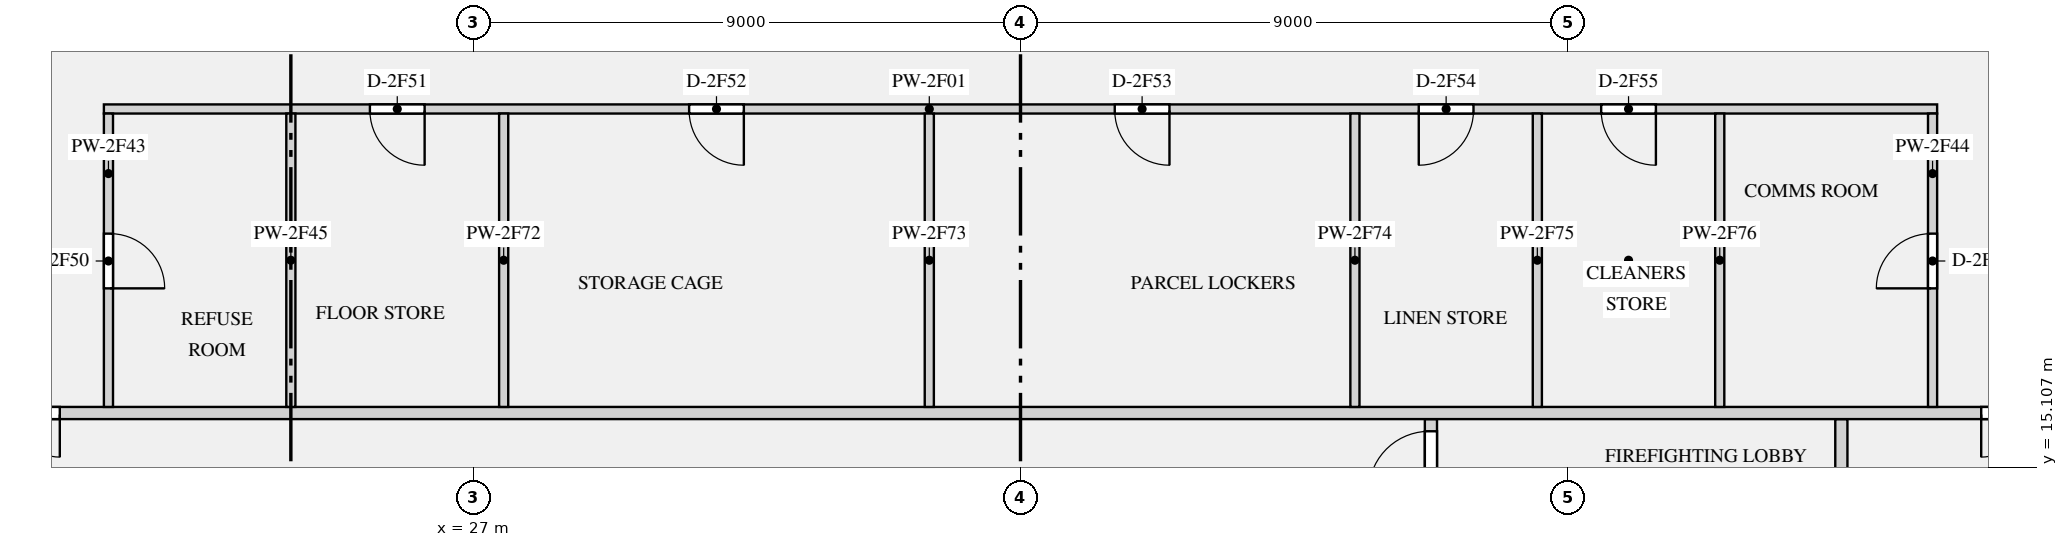
"""IFC4 building model, lengths in metres.
Left out: names, types, materials, properties, quantities, classifications, styles, units other than length and angle.
Written with IfcOpenShell. Run it as: python <this file> out.ifc"""

import sys

from ifc_helpers import new_model, si_unit, direction, frame, frame_2d, origin, place, context, subcontext, project, spatial, rectangle, extrude, element, fill, save


model = new_model("IFC4")
c1 = context("Model", 3, precision=1e-05, world=origin(), true_north=direction((0.0, 1.0)))
c2 = subcontext(c1, "Body", "Model", "MODEL_VIEW")
j1 = project(units=[si_unit("LENGTHUNIT", "METRE"), si_unit("PLANEANGLEUNIT", "RADIAN")], contexts=[c1])
p1 = place(None, origin())
s1 = spatial("IfcSite", under=j1, at=p1, CompositionType="ELEMENT")
p2 = place(p1, origin())
s2 = spatial("IfcBuilding", under=s1, at=p2, CompositionType="ELEMENT")
p3 = place(p2, frame((0.0, 0.0, 124.5)))
s3 = spatial("IfcBuildingStorey", under=s2, at=p3, CompositionType="ELEMENT", Elevation=124.5)
p4 = place(p3, frame((49.5, 12.5, 0.0), z_axis=(0.0, 0.0, 1.0), x_axis=(0.0, 1.0, 0.0)))
e1 = element("IfcWall", 1, at=p4, inside=s3, PredefinedType="PARTITIONING", context=c2, shape_type="SweptSolid", body=[
    extrude(rectangle(XDim=3.4, YDim=0.2, at=frame_2d((1.7, 0.0))), origin(), (0.0, 0.0, 1.0), 2.83),
])
p5 = place(p4, frame((1.15, 0.0, 0.0)))
e2 = element("IfcOpeningElement", 2, at=p5, cuts=e1, PredefinedType="OPENING", context=c2, shape_type="SweptSolid", body=[
    extrude(rectangle(XDim=1.1, YDim=2.1, at=frame_2d((0.55, 1.05))), frame((0.0, 0.11, 0.0), z_axis=(0.0, -1.0, 0.0), x_axis=(1.0, 0.0, 0.0)), (0.0, 0.0, 1.0), 0.22),
])
p6 = place(p3, frame((42.75, 14.575, 0.0), z_axis=(0.0, 0.0, 1.0), x_axis=(0.0, 1.0, 0.0)))
e3 = element("IfcWall", 3, at=p6, inside=s3, PredefinedType="PARTITIONING", context=c2, shape_type="SweptSolid", body=[
    extrude(rectangle(XDim=1.325, YDim=0.2, at=frame_2d((0.663, 0.0))), origin(), (0.0, 0.0, 1.0), 2.83),
])
p7 = place(p6, frame((0.125, 0.0, 0.0)))
e4 = element("IfcOpeningElement", 4, at=p7, cuts=e3, PredefinedType="OPENING", context=c2, shape_type="SweptSolid", body=[
    extrude(rectangle(XDim=1.0, YDim=2.1, at=frame_2d((0.5, 1.05))), frame((0.0, 0.11, 0.0), z_axis=(0.0, -1.0, 0.0), x_axis=(1.0, 0.0, 0.0)), (0.0, 0.0, 1.0), 0.22),
])
p8 = place(p3, frame((20.925, 21.0, 0.0), z_axis=(0.0, 0.0, 1.0), x_axis=(1.0, 0.0, 0.0)))
e5 = element("IfcWall", 5, at=p8, inside=s3, PredefinedType="PARTITIONING", context=c2, shape_type="SweptSolid", body=[
    extrude(rectangle(XDim=30.15, YDim=0.15, at=frame_2d((15.075, 0.0))), origin(), (0.0, 0.0, 1.0), 2.83),
])
p9 = place(p8, frame((4.375, 0.0, 0.0)))
e6 = element("IfcOpeningElement", 6, at=p9, cuts=e5, PredefinedType="OPENING", context=c2, shape_type="SweptSolid", body=[
    extrude(rectangle(XDim=0.9, YDim=2.1, at=frame_2d((0.45, 1.05))), frame((0.0, 0.085, 0.0), z_axis=(0.0, -1.0, 0.0), x_axis=(1.0, 0.0, 0.0)), (0.0, 0.0, 1.0), 0.17),
])
p10 = place(p8, frame((9.625, 0.0, 0.0)))
e7 = element("IfcOpeningElement", 7, at=p10, cuts=e5, PredefinedType="OPENING", context=c2, shape_type="SweptSolid", body=[
    extrude(rectangle(XDim=0.9, YDim=2.1, at=frame_2d((0.45, 1.05))), frame((0.0, 0.085, 0.0), z_axis=(0.0, -1.0, 0.0), x_axis=(1.0, 0.0, 0.0)), (0.0, 0.0, 1.0), 0.17),
])
p11 = place(p8, frame((16.625, 0.0, 0.0)))
e8 = element("IfcOpeningElement", 8, at=p11, cuts=e5, PredefinedType="OPENING", context=c2, shape_type="SweptSolid", body=[
    extrude(rectangle(XDim=0.9, YDim=2.1, at=frame_2d((0.45, 1.05))), frame((0.0, 0.085, 0.0), z_axis=(0.0, -1.0, 0.0), x_axis=(1.0, 0.0, 0.0)), (0.0, 0.0, 1.0), 0.17),
])
p12 = place(p8, frame((21.625, 0.0, 0.0)))
e9 = element("IfcOpeningElement", 9, at=p12, cuts=e5, PredefinedType="OPENING", context=c2, shape_type="SweptSolid", body=[
    extrude(rectangle(XDim=0.9, YDim=2.1, at=frame_2d((0.45, 1.05))), frame((0.0, 0.085, 0.0), z_axis=(0.0, -1.0, 0.0), x_axis=(1.0, 0.0, 0.0)), (0.0, 0.0, 1.0), 0.17),
])
p13 = place(p8, frame((24.625, 0.0, 0.0)))
e10 = element("IfcOpeningElement", 10, at=p13, cuts=e5, PredefinedType="OPENING", context=c2, shape_type="SweptSolid", body=[
    extrude(rectangle(XDim=0.9, YDim=2.1, at=frame_2d((0.45, 1.05))), frame((0.0, 0.085, 0.0), z_axis=(0.0, -1.0, 0.0), x_axis=(1.0, 0.0, 0.0)), (0.0, 0.0, 1.0), 0.17),
])
p14 = place(p3, frame((17.9, 16.0, 0.0), z_axis=(0.0, 0.0, 1.0), x_axis=(1.0, 0.0, 0.0)))
e11 = element("IfcWall", 11, at=p14, inside=s3, PredefinedType="PARTITIONING", context=c2, shape_type="SweptSolid", body=[
    extrude(rectangle(XDim=36.2, YDim=0.2, at=frame_2d((18.1, 0.0))), origin(), (0.0, 0.0, 1.0), 2.83),
])
p15 = place(p14, frame((0.9, 0.0, 0.0)))
e12 = element("IfcOpeningElement", 12, at=p15, cuts=e11, PredefinedType="OPENING", context=c2, shape_type="SweptSolid", body=[
    extrude(rectangle(XDim=1.4, YDim=2.1, at=frame_2d((0.7, 1.05))), frame((0.0, 0.11, 0.0), z_axis=(0.0, -1.0, 0.0), x_axis=(1.0, 0.0, 0.0)), (0.0, 0.0, 1.0), 0.22),
])
p16 = place(p14, frame((33.9, 0.0, 0.0)))
e13 = element("IfcOpeningElement", 13, at=p16, cuts=e11, PredefinedType="OPENING", context=c2, shape_type="SweptSolid", body=[
    extrude(rectangle(XDim=1.4, YDim=2.1, at=frame_2d((0.7, 1.05))), frame((0.0, 0.11, 0.0), z_axis=(0.0, -1.0, 0.0), x_axis=(1.0, 0.0, 0.0)), (0.0, 0.0, 1.0), 0.22),
])
p17 = place(p3, frame((21.0, 16.1, 0.0), z_axis=(0.0, 0.0, 1.0), x_axis=(0.0, 1.0, 0.0)))
e14 = element("IfcWall", 14, at=p17, inside=s3, PredefinedType="PARTITIONING", context=c2, shape_type="SweptSolid", body=[
    extrude(rectangle(XDim=4.825, YDim=0.15, at=frame_2d((2.413, 0.0))), origin(), (0.0, 0.0, 1.0), 2.83),
])
p18 = place(p17, frame((1.95, 0.0, 0.0)))
e15 = element("IfcOpeningElement", 15, at=p18, cuts=e14, PredefinedType="OPENING", context=c2, shape_type="SweptSolid", body=[
    extrude(rectangle(XDim=0.9, YDim=2.1, at=frame_2d((0.45, 1.05))), frame((0.0, 0.085, 0.0), z_axis=(0.0, -1.0, 0.0), x_axis=(1.0, 0.0, 0.0)), (0.0, 0.0, 1.0), 0.17),
])
p19 = place(p3, frame((51.0, 16.1, 0.0), z_axis=(0.0, 0.0, 1.0), x_axis=(0.0, 1.0, 0.0)))
e16 = element("IfcWall", 16, at=p19, inside=s3, PredefinedType="PARTITIONING", context=c2, shape_type="SweptSolid", body=[
    extrude(rectangle(XDim=4.825, YDim=0.15, at=frame_2d((2.413, 0.0))), origin(), (0.0, 0.0, 1.0), 2.83),
])
p20 = place(p19, frame((1.95, 0.0, 0.0)))
e17 = element("IfcOpeningElement", 17, at=p20, cuts=e16, PredefinedType="OPENING", context=c2, shape_type="SweptSolid", body=[
    extrude(rectangle(XDim=0.9, YDim=2.1, at=frame_2d((0.45, 1.05))), frame((0.0, 0.085, 0.0), z_axis=(0.0, -1.0, 0.0), x_axis=(1.0, 0.0, 0.0)), (0.0, 0.0, 1.0), 0.17),
])
for number, where, z_axis, x_axis in (
    (18, (24.0, 16.1, 0.0), (0.0, 0.0, 1.0), (0.0, 1.0, 0.0)),
    (19, (27.5, 16.1, 0.0), (0.0, 0.0, 1.0), (0.0, 1.0, 0.0)),
    (20, (34.5, 16.1, 0.0), (0.0, 0.0, 1.0), (0.0, 1.0, 0.0)),
    (21, (41.5, 16.1, 0.0), (0.0, 0.0, 1.0), (0.0, 1.0, 0.0)),
    (22, (44.5, 16.1, 0.0), (0.0, 0.0, 1.0), (0.0, 1.0, 0.0)),
    (23, (47.5, 16.1, 0.0), (0.0, 0.0, 1.0), (0.0, 1.0, 0.0)),
):
    element("IfcWall", number, at=place(p3, frame(where, z_axis=z_axis, x_axis=x_axis)), inside=s3, PredefinedType="PARTITIONING", context=c2, shape_type="SweptSolid", body=[
        extrude(rectangle(XDim=4.825, YDim=0.15, at=frame_2d((2.413, 0.0))), origin(), (0.0, 0.0, 1.0), 2.83),
    ])
p21 = place(p7, origin())
e24 = element("IfcDoor", 24, at=p21, inside=s3, OperationType="SINGLE_SWING_LEFT", PredefinedType="DOOR", context=c2, shape_type="SweptSolid", body=[
    extrude(rectangle(XDim=1.0, YDim=2.1, at=frame_2d((0.5, 1.05))), frame((0.0, 0.025, 0.0), z_axis=(0.0, -1.0, 0.0), x_axis=(1.0, 0.0, 0.0)), (0.0, 0.0, 1.0), 0.05),
])
fill(e4, e24)
p22 = place(p15, frame((1.4, 0.0, 0.0), z_axis=(0.0, 0.0, 1.0), x_axis=(-1.0, 0.0, 0.0)))
e25 = element("IfcDoor", 25, at=p22, inside=s3, OperationType="DOUBLE_DOOR_SINGLE_SWING", PredefinedType="DOOR", context=c2, shape_type="SweptSolid", body=[
    extrude(rectangle(XDim=1.4, YDim=2.1, at=frame_2d((0.7, 1.05))), frame((0.0, 0.025, 0.0), z_axis=(0.0, -1.0, 0.0), x_axis=(1.0, 0.0, 0.0)), (0.0, 0.0, 1.0), 0.05),
])
fill(e12, e25)
p23 = place(p16, frame((1.4, 0.0, 0.0), z_axis=(0.0, 0.0, 1.0), x_axis=(-1.0, 0.0, 0.0)))
e26 = element("IfcDoor", 26, at=p23, inside=s3, OperationType="DOUBLE_DOOR_SINGLE_SWING", PredefinedType="DOOR", context=c2, shape_type="SweptSolid", body=[
    extrude(rectangle(XDim=1.4, YDim=2.1, at=frame_2d((0.7, 1.05))), frame((0.0, 0.025, 0.0), z_axis=(0.0, -1.0, 0.0), x_axis=(1.0, 0.0, 0.0)), (0.0, 0.0, 1.0), 0.05),
])
fill(e13, e26)
p24 = place(p18, frame((0.9, 0.0, 0.0), z_axis=(0.0, 0.0, 1.0), x_axis=(-1.0, 0.0, 0.0)))
e27 = element("IfcDoor", 27, at=p24, inside=s3, OperationType="SINGLE_SWING_RIGHT", PredefinedType="DOOR", context=c2, shape_type="SweptSolid", body=[
    extrude(rectangle(XDim=0.9, YDim=2.1, at=frame_2d((0.45, 1.05))), frame((0.0, 0.025, 0.0), z_axis=(0.0, -1.0, 0.0), x_axis=(1.0, 0.0, 0.0)), (0.0, 0.0, 1.0), 0.05),
])
fill(e15, e27)
p25 = place(p9, frame((0.9, 0.0, 0.0), z_axis=(0.0, 0.0, 1.0), x_axis=(-1.0, 0.0, 0.0)))
e28 = element("IfcDoor", 28, at=p25, inside=s3, OperationType="SINGLE_SWING_LEFT", PredefinedType="DOOR", context=c2, shape_type="SweptSolid", body=[
    extrude(rectangle(XDim=0.9, YDim=2.1, at=frame_2d((0.45, 1.05))), frame((0.0, 0.025, 0.0), z_axis=(0.0, -1.0, 0.0), x_axis=(1.0, 0.0, 0.0)), (0.0, 0.0, 1.0), 0.05),
])
fill(e6, e28)
p26 = place(p10, frame((0.9, 0.0, 0.0), z_axis=(0.0, 0.0, 1.0), x_axis=(-1.0, 0.0, 0.0)))
e29 = element("IfcDoor", 29, at=p26, inside=s3, OperationType="SINGLE_SWING_LEFT", PredefinedType="DOOR", context=c2, shape_type="SweptSolid", body=[
    extrude(rectangle(XDim=0.9, YDim=2.1, at=frame_2d((0.45, 1.05))), frame((0.0, 0.025, 0.0), z_axis=(0.0, -1.0, 0.0), x_axis=(1.0, 0.0, 0.0)), (0.0, 0.0, 1.0), 0.05),
])
fill(e7, e29)
p27 = place(p11, frame((0.9, 0.0, 0.0), z_axis=(0.0, 0.0, 1.0), x_axis=(-1.0, 0.0, 0.0)))
e30 = element("IfcDoor", 30, at=p27, inside=s3, OperationType="SINGLE_SWING_LEFT", PredefinedType="DOOR", context=c2, shape_type="SweptSolid", body=[
    extrude(rectangle(XDim=0.9, YDim=2.1, at=frame_2d((0.45, 1.05))), frame((0.0, 0.025, 0.0), z_axis=(0.0, -1.0, 0.0), x_axis=(1.0, 0.0, 0.0)), (0.0, 0.0, 1.0), 0.05),
])
fill(e8, e30)
p28 = place(p12, frame((0.9, 0.0, 0.0), z_axis=(0.0, 0.0, 1.0), x_axis=(-1.0, 0.0, 0.0)))
e31 = element("IfcDoor", 31, at=p28, inside=s3, OperationType="SINGLE_SWING_RIGHT", PredefinedType="DOOR", context=c2, shape_type="SweptSolid", body=[
    extrude(rectangle(XDim=0.9, YDim=2.1, at=frame_2d((0.45, 1.05))), frame((0.0, 0.025, 0.0), z_axis=(0.0, -1.0, 0.0), x_axis=(1.0, 0.0, 0.0)), (0.0, 0.0, 1.0), 0.05),
])
fill(e9, e31)
p29 = place(p13, frame((0.9, 0.0, 0.0), z_axis=(0.0, 0.0, 1.0), x_axis=(-1.0, 0.0, 0.0)))
e32 = element("IfcDoor", 32, at=p29, inside=s3, OperationType="SINGLE_SWING_LEFT", PredefinedType="DOOR", context=c2, shape_type="SweptSolid", body=[
    extrude(rectangle(XDim=0.9, YDim=2.1, at=frame_2d((0.45, 1.05))), frame((0.0, 0.025, 0.0), z_axis=(0.0, -1.0, 0.0), x_axis=(1.0, 0.0, 0.0)), (0.0, 0.0, 1.0), 0.05),
])
fill(e10, e32)
p30 = place(p20, origin())
e33 = element("IfcDoor", 33, at=p30, inside=s3, OperationType="SINGLE_SWING_LEFT", PredefinedType="DOOR", context=c2, shape_type="SweptSolid", body=[
    extrude(rectangle(XDim=0.9, YDim=2.1, at=frame_2d((0.45, 1.05))), frame((0.0, 0.025, 0.0), z_axis=(0.0, -1.0, 0.0), x_axis=(1.0, 0.0, 0.0)), (0.0, 0.0, 1.0), 0.05),
])
fill(e17, e33)
save(model, sys.argv[1])
